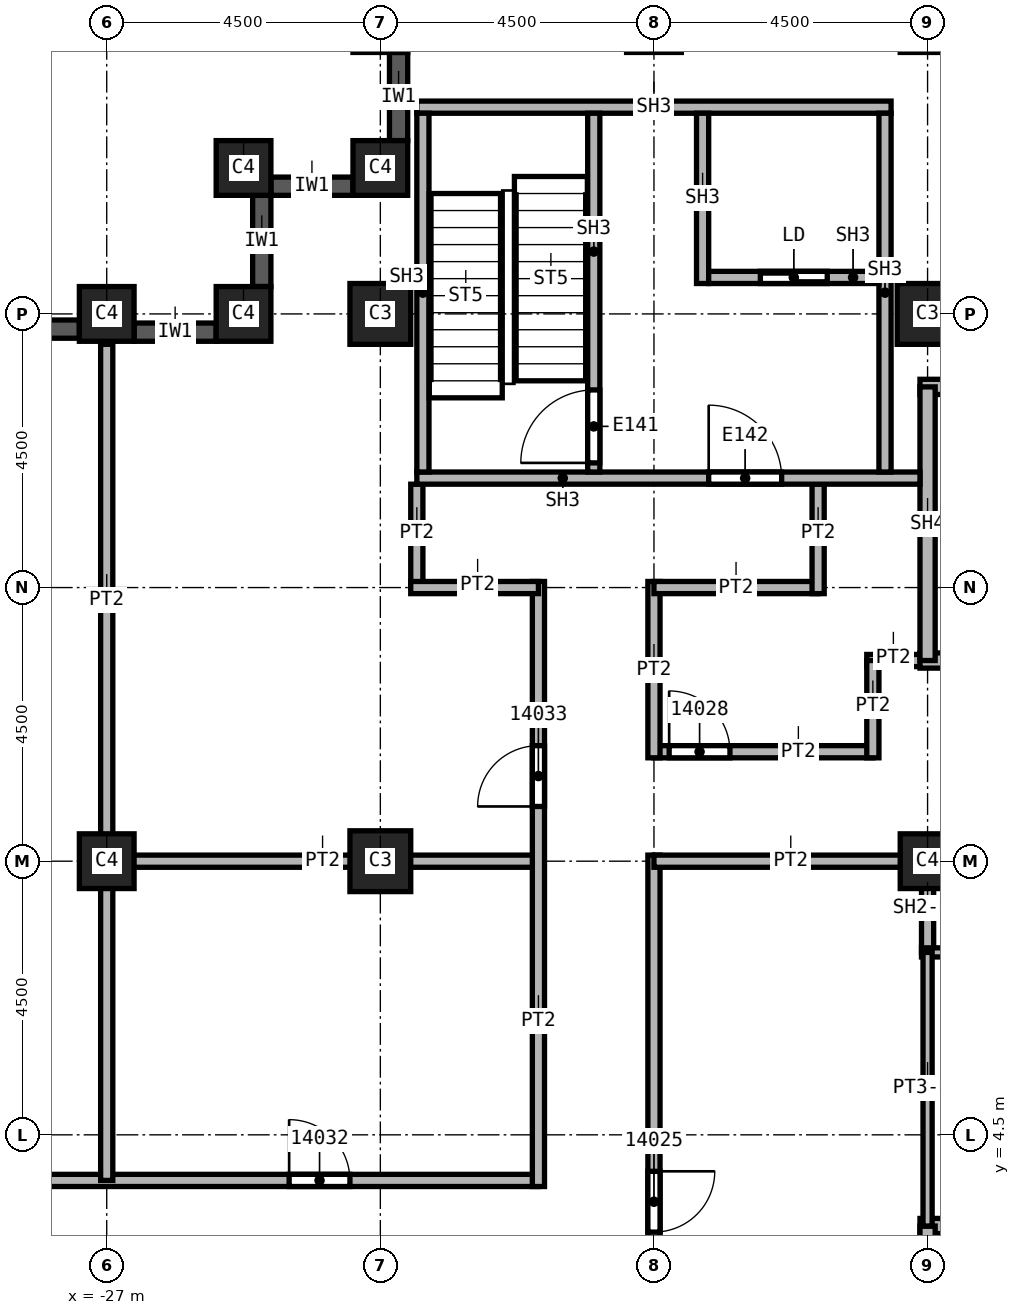
"""IFC4 building model, lengths in metres.
Left out: names, types, materials, properties, quantities, classifications, styles, units other than length and angle.
Written with IfcOpenShell. Run it as: python <this file> out.ifc"""

import sys

from ifc_helpers import new_model, si_unit, direction, frame, frame_2d, origin, origin_2d, place, context, subcontext, project, spatial, rectangle, extrude, element, fill, save


model = new_model("IFC4")
c1 = context("Model", 3, precision=1e-05, world=origin(), true_north=direction((0.0, 1.0)))
c2 = subcontext(c1, "Body", "Model", "MODEL_VIEW")
j1 = project(units=[si_unit("LENGTHUNIT", "METRE"), si_unit("PLANEANGLEUNIT", "RADIAN")], contexts=[c1])
p1 = place(None, origin())
s1 = spatial("IfcSite", under=j1, at=p1, CompositionType="ELEMENT")
p2 = place(p1, origin())
s2 = spatial("IfcBuilding", under=s1, at=p2, CompositionType="ELEMENT")
p3 = place(p2, frame((0.0, 0.0, 224.0)))
s3 = spatial("IfcBuildingStorey", under=s2, at=p3, CompositionType="ELEMENT", Elevation=224.0)
for number, where, z_axis, x_axis in (
    (1, (-13.5, 18.0, 0.0), (0.0, 0.0, 1.0), (1.0, 0.0, 0.0)),
    (2, (-22.5, 9.0, 0.0), (0.0, 0.0, 1.0), (1.0, 0.0, 0.0)),
    (3, (-22.5, 18.0, 0.0), (0.0, 0.0, 1.0), (1.0, 0.0, 0.0)),
):
    element("IfcColumn", number, at=place(p3, frame(where, z_axis=z_axis, x_axis=x_axis)), inside=s3, PredefinedType="COLUMN", context=c2, shape_type="SweptSolid", body=[
        extrude(rectangle(XDim=1.0, YDim=1.0, at=origin_2d()), origin(), (0.0, 0.0, 1.0), 3.72),
    ])
for number, where, z_axis, x_axis in (
    (4, (-13.5, 9.0, 0.0), (0.0, 0.0, 1.0), (1.0, 0.0, 0.0)),
    (5, (-27.0, 9.0, 0.0), (0.0, 0.0, 1.0), (1.0, 0.0, 0.0)),
    (6, (-27.0, 18.0, 0.0), (0.0, 0.0, 1.0), (1.0, 0.0, 0.0)),
    (7, (-22.5, 20.4, 0.0), (0.0, 0.0, 1.0), (1.0, 0.0, 0.0)),
    (8, (-24.75, 20.4, 0.0), (0.0, 0.0, 1.0), (1.0, 0.0, 0.0)),
    (9, (-24.75, 18.0, 0.0), (0.0, 0.0, 1.0), (1.0, 0.0, 0.0)),
):
    element("IfcColumn", number, at=place(p3, frame(where, z_axis=z_axis, x_axis=x_axis)), inside=s3, PredefinedType="COLUMN", context=c2, shape_type="SweptSolid", body=[
        extrude(rectangle(XDim=0.9, YDim=0.9, at=origin_2d()), origin(), (0.0, 0.0, 1.0), 3.72),
    ])
p4 = place(p3, frame((-22.95, 20.1, 0.0), z_axis=(0.0, 0.0, 1.0), x_axis=(-1.0, 0.0, 0.0)))
e10 = element("IfcWall", 10, at=p4, inside=s3, PredefinedType="SOLIDWALL", context=c2, shape_type="SweptSolid", body=[
    extrude(rectangle(XDim=1.35, YDim=0.3, at=frame_2d((0.675, 0.0))), origin(), (0.0, 0.0, 1.0), 3.12),
])
p5 = place(p3, frame((-24.45, 19.95, 0.0), z_axis=(0.0, 0.0, 1.0), x_axis=(0.0, -1.0, 0.0)))
e11 = element("IfcWall", 11, at=p5, inside=s3, PredefinedType="SOLIDWALL", context=c2, shape_type="SweptSolid", body=[
    extrude(rectangle(XDim=1.5, YDim=0.3, at=frame_2d((0.75, 0.0))), origin(), (0.0, 0.0, 1.0), 3.12),
])
p6 = place(p3, frame((-25.2, 17.7, 0.0), z_axis=(0.0, 0.0, 1.0), x_axis=(-1.0, 0.0, 0.0)))
e12 = element("IfcWall", 12, at=p6, inside=s3, PredefinedType="SOLIDWALL", context=c2, shape_type="SweptSolid", body=[
    extrude(rectangle(XDim=1.35, YDim=0.3, at=frame_2d((0.675, 0.0))), origin(), (0.0, 0.0, 1.0), 3.12),
])
p7 = place(p3, frame((-27.45, 17.75, 0.0), z_axis=(0.0, 0.0, 1.0), x_axis=(-1.0, 0.0, 0.0)))
e13 = element("IfcWall", 13, at=p7, inside=s3, PredefinedType="SOLIDWALL", context=c2, shape_type="SweptSolid", body=[
    extrude(rectangle(XDim=3.6, YDim=0.3, at=frame_2d((1.8, 0.0))), origin(), (0.0, 0.0, 1.0), 3.12),
])
p8 = place(p7, frame((0.6, 0.0, 0.8)))
e14 = element("IfcOpeningElement", 14, at=p8, cuts=e13, PredefinedType="OPENING", context=c2, shape_type="SweptSolid", body=[
    extrude(rectangle(XDim=2.4, YDim=1.95, at=frame_2d((1.2, 0.975))), frame((0.0, 0.15, 0.0), z_axis=(0.0, -1.0, 0.0), x_axis=(1.0, 0.0, 0.0)), (0.0, 0.0, 1.0), 0.3),
])
p9 = place(p3, frame((-22.2, 22.3, 0.0), z_axis=(0.0, 0.0, 1.0), x_axis=(0.0, -1.0, 0.0)))
e15 = element("IfcWall", 15, at=p9, inside=s3, PredefinedType="SOLIDWALL", context=c2, shape_type="SweptSolid", body=[
    extrude(rectangle(XDim=1.45, YDim=0.3, at=frame_2d((0.725, 0.0))), origin(), (0.0, 0.0, 1.0), 3.12),
])
p10 = place(p3, frame((-33.85, 3.75, 0.0), z_axis=(0.0, 0.0, 1.0), x_axis=(1.0, 0.0, 0.0)))
e16 = element("IfcWall", 16, at=p10, inside=s3, PredefinedType="PARTITIONING", context=c2, shape_type="SweptSolid", body=[
    extrude(rectangle(XDim=13.95, YDim=0.2, at=frame_2d((6.975, 0.0))), origin(), (0.0, 0.0, 1.0), 3.72),
])
p11 = place(p10, frame((9.85, 0.0, 0.0)))
e17 = element("IfcOpeningElement", 17, at=p11, cuts=e16, PredefinedType="OPENING", context=c2, shape_type="SweptSolid", body=[
    extrude(rectangle(XDim=1.0, YDim=2.1, at=frame_2d((0.5, 1.05))), frame((0.0, 0.1, 0.0), z_axis=(0.0, -1.0, 0.0), x_axis=(1.0, 0.0, 0.0)), (0.0, 0.0, 1.0), 0.2),
])
p12 = place(p3, frame((-27.1, 9.0, 0.0), z_axis=(0.0, 0.0, 1.0), x_axis=(1.0, 0.0, 0.0)))
e18 = element("IfcWall", 18, at=p12, inside=s3, PredefinedType="PARTITIONING", context=c2, shape_type="SweptSolid", body=[
    extrude(rectangle(XDim=7.2, YDim=0.2, at=frame_2d((3.6, 0.0))), origin(), (0.0, 0.0, 1.0), 3.72),
])
p13 = place(p3, frame((-27.0, 3.75, 0.0), z_axis=(0.0, 0.0, 1.0), x_axis=(0.0, 1.0, 0.0)))
e19 = element("IfcWall", 19, at=p13, inside=s3, PredefinedType="PARTITIONING", context=c2, shape_type="SweptSolid", body=[
    extrude(rectangle(XDim=13.75, YDim=0.2, at=frame_2d((6.875, 0.0))), origin(), (0.0, 0.0, 1.0), 3.72),
])
p14 = place(p3, frame((-21.9, 13.5, 0.0), z_axis=(0.0, 0.0, 1.0), x_axis=(0.0, 1.0, 0.0)))
e20 = element("IfcWall", 20, at=p14, inside=s3, PredefinedType="PARTITIONING", context=c2, shape_type="SweptSolid", body=[
    extrude(rectangle(XDim=1.7, YDim=0.2, at=frame_2d((0.85, 0.0))), origin(), (0.0, 0.0, 1.0), 3.72),
])
p15 = place(p3, frame((-19.9, 3.65, 0.0), z_axis=(0.0, 0.0, 1.0), x_axis=(0.0, 1.0, 0.0)))
e21 = element("IfcWall", 21, at=p15, inside=s3, PredefinedType="PARTITIONING", context=c2, shape_type="SweptSolid", body=[
    extrude(rectangle(XDim=9.95, YDim=0.2, at=frame_2d((4.975, 0.0))), origin(), (0.0, 0.0, 1.0), 3.72),
])
p16 = place(p15, frame((6.25, 0.0, 0.0)))
e22 = element("IfcOpeningElement", 22, at=p16, cuts=e21, PredefinedType="OPENING", context=c2, shape_type="SweptSolid", body=[
    extrude(rectangle(XDim=1.0, YDim=2.1, at=frame_2d((0.5, 1.05))), frame((0.0, 0.1, 0.0), z_axis=(0.0, -1.0, 0.0), x_axis=(1.0, 0.0, 0.0)), (0.0, 0.0, 1.0), 0.2),
])
p17 = place(p3, frame((-19.9, 13.5, 0.0), z_axis=(0.0, 0.0, 1.0), x_axis=(-1.0, 0.0, 0.0)))
e23 = element("IfcWall", 23, at=p17, inside=s3, PredefinedType="PARTITIONING", context=c2, shape_type="SweptSolid", body=[
    extrude(rectangle(XDim=2.1, YDim=0.2, at=frame_2d((1.05, 0.0))), origin(), (0.0, 0.0, 1.0), 3.72),
])
p18 = place(p3, frame((-18.0, 9.1, 0.0), z_axis=(0.0, 0.0, 1.0), x_axis=(0.0, -1.0, 0.0)))
e24 = element("IfcWall", 24, at=p18, inside=s3, PredefinedType="PARTITIONING", context=c2, shape_type="SweptSolid", body=[
    extrude(rectangle(XDim=18.2, YDim=0.2, at=frame_2d((9.1, 0.0))), origin(), (0.0, 0.0, 1.0), 3.72),
])
p19 = place(p18, frame((15.1, 0.0, 0.0)))
e25 = element("IfcOpeningElement", 25, at=p19, cuts=e24, PredefinedType="OPENING", context=c2, shape_type="SweptSolid", body=[
    extrude(rectangle(XDim=1.0, YDim=2.1, at=frame_2d((0.5, 1.05))), frame((0.0, 0.1, 0.0), z_axis=(0.0, -1.0, 0.0), x_axis=(1.0, 0.0, 0.0)), (0.0, 0.0, 1.0), 0.2),
])
p20 = place(p18, frame((5.2, 0.0, 0.0)))
e26 = element("IfcOpeningElement", 26, at=p20, cuts=e24, PredefinedType="OPENING", context=c2, shape_type="SweptSolid", body=[
    extrude(rectangle(XDim=1.0, YDim=2.1, at=frame_2d((0.5, 1.05))), frame((0.0, 0.1, 0.0), z_axis=(0.0, -1.0, 0.0), x_axis=(1.0, 0.0, 0.0)), (0.0, 0.0, 1.0), 0.2),
])
p21 = place(p3, frame((-18.0, 10.8, 0.0), z_axis=(0.0, 0.0, 1.0), x_axis=(1.0, 0.0, 0.0)))
e27 = element("IfcWall", 27, at=p21, inside=s3, PredefinedType="PARTITIONING", context=c2, shape_type="SweptSolid", body=[
    extrude(rectangle(XDim=3.6, YDim=0.2, at=frame_2d((1.8, 0.0))), origin(), (0.0, 0.0, 1.0), 3.72),
])
p22 = place(p21, frame((0.25, 0.0, 0.0)))
e28 = element("IfcOpeningElement", 28, at=p22, cuts=e27, PredefinedType="OPENING", context=c2, shape_type="SweptSolid", body=[
    extrude(rectangle(XDim=1.0, YDim=2.1, at=frame_2d((0.5, 1.05))), frame((0.0, 0.1, 0.0), z_axis=(0.0, -1.0, 0.0), x_axis=(1.0, 0.0, 0.0)), (0.0, 0.0, 1.0), 0.2),
])
p23 = place(p3, frame((-18.0, 13.6, 0.0), z_axis=(0.0, 0.0, 1.0), x_axis=(0.0, -1.0, 0.0)))
e29 = element("IfcWall", 29, at=p23, inside=s3, PredefinedType="PARTITIONING", context=c2, shape_type="SweptSolid", body=[
    extrude(rectangle(XDim=2.9, YDim=0.2, at=frame_2d((1.45, 0.0))), origin(), (0.0, 0.0, 1.0), 3.72),
])
p24 = place(p3, frame((-15.3, 13.5, 0.0), z_axis=(0.0, 0.0, 1.0), x_axis=(-1.0, 0.0, 0.0)))
e30 = element("IfcWall", 30, at=p24, inside=s3, PredefinedType="PARTITIONING", context=c2, shape_type="SweptSolid", body=[
    extrude(rectangle(XDim=2.7, YDim=0.2, at=frame_2d((1.35, 0.0))), origin(), (0.0, 0.0, 1.0), 3.72),
])
p25 = place(p3, frame((-15.3, 15.2, 0.0), z_axis=(0.0, 0.0, 1.0), x_axis=(0.0, -1.0, 0.0)))
e31 = element("IfcWall", 31, at=p25, inside=s3, PredefinedType="PARTITIONING", context=c2, shape_type="SweptSolid", body=[
    extrude(rectangle(XDim=1.8, YDim=0.2, at=frame_2d((0.9, 0.0))), origin(), (0.0, 0.0, 1.0), 3.72),
])
p26 = place(p3, frame((-14.5, 12.3, 0.0), z_axis=(0.0, 0.0, 1.0), x_axis=(1.0, 0.0, 0.0)))
e32 = element("IfcWall", 32, at=p26, inside=s3, PredefinedType="PARTITIONING", context=c2, shape_type="SweptSolid", body=[
    extrude(rectangle(XDim=1.125, YDim=0.2, at=frame_2d((0.562, 0.0))), origin(), (0.0, 0.0, 1.0), 3.72),
])
p27 = place(p3, frame((-13.5, 9.0, 0.0), z_axis=(0.0, 0.0, 1.0), x_axis=(-1.0, 0.0, 0.0)))
e33 = element("IfcWall", 33, at=p27, inside=s3, PredefinedType="PARTITIONING", context=c2, shape_type="SweptSolid", body=[
    extrude(rectangle(XDim=4.5, YDim=0.2, at=frame_2d((2.25, 0.0))), origin(), (0.0, 0.0, 1.0), 3.72),
])
p28 = place(p3, frame((-14.4, 10.7, 0.0), z_axis=(0.0, 0.0, 1.0), x_axis=(0.0, 1.0, 0.0)))
e34 = element("IfcWall", 34, at=p28, inside=s3, PredefinedType="PARTITIONING", context=c2, shape_type="SweptSolid", body=[
    extrude(rectangle(XDim=1.6, YDim=0.2, at=frame_2d((0.8, 0.0))), origin(), (0.0, 0.0, 1.0), 3.72),
])
p29 = place(p3, frame((-13.6, 9.0, 0.0), z_axis=(0.0, 0.0, 1.0), x_axis=(1.0, 0.0, 0.0)))
e35 = element("IfcWall", 35, at=p29, inside=s3, PredefinedType="SOLIDWALL", context=c2, shape_type="SweptSolid", body=[
    extrude(rectangle(XDim=3.1, YDim=0.2, at=frame_2d((1.55, 0.0))), origin(), (0.0, 0.0, 1.0), 2.958),
])
p30 = place(p29, frame((0.85, 0.0, 0.0)))
e36 = element("IfcOpeningElement", 36, at=p30, cuts=e35, PredefinedType="OPENING", context=c2, shape_type="SweptSolid", body=[
    extrude(rectangle(XDim=1.1, YDim=2.1, at=frame_2d((0.55, 1.05))), frame((0.0, 0.1, 0.0), z_axis=(0.0, -1.0, 0.0), x_axis=(1.0, 0.0, 0.0)), (0.0, 0.0, 1.0), 0.2),
])
p31 = place(p3, frame((-13.5, 7.5, 0.0), z_axis=(0.0, 0.0, 1.0), x_axis=(0.0, 1.0, 0.0)))
e37 = element("IfcWall", 37, at=p31, inside=s3, PredefinedType="SOLIDWALL", context=c2, shape_type="SweptSolid", body=[
    extrude(rectangle(XDim=1.6, YDim=0.2, at=frame_2d((0.8, 0.0))), origin(), (0.0, 0.0, 1.0), 2.958),
])
p32 = place(p3, frame((-13.625, 3.0, 0.0), z_axis=(0.0, 0.0, 1.0), x_axis=(1.0, 0.0, 0.0)))
e38 = element("IfcWall", 38, at=p32, inside=s3, PredefinedType="SOLIDWALL", context=c2, shape_type="SweptSolid", body=[
    extrude(rectangle(XDim=9.25, YDim=0.25, at=frame_2d((4.625, 0.0))), origin(), (0.0, 0.0, 1.0), 3.72),
])
p33 = place(p32, frame((3.25, 0.0, 0.0)))
e39 = element("IfcOpeningElement", 39, at=p33, cuts=e38, PredefinedType="OPENING", context=c2, shape_type="SweptSolid", body=[
    extrude(rectangle(XDim=1.1, YDim=2.1, at=frame_2d((0.55, 1.05))), frame((0.0, 0.125, 0.0), z_axis=(0.0, -1.0, 0.0), x_axis=(1.0, 0.0, 0.0)), (0.0, 0.0, 1.0), 0.25),
])
p34 = place(p3, frame((-13.5, -3.0, 0.0), z_axis=(0.0, 0.0, 1.0), x_axis=(0.0, 1.0, 0.0)))
e40 = element("IfcWall", 40, at=p34, inside=s3, PredefinedType="SOLIDWALL", context=c2, shape_type="SweptSolid", body=[
    extrude(rectangle(XDim=6.0, YDim=0.25, at=frame_2d((3.0, 0.0))), origin(), (0.0, 0.0, 1.0), 2.958),
])
p35 = place(p3, frame((-13.625, 12.3, 0.0), z_axis=(0.0, 0.0, 1.0), x_axis=(1.0, 0.0, 0.0)))
e41 = element("IfcWall", 41, at=p35, inside=s3, PredefinedType="SOLIDWALL", context=c2, shape_type="SweptSolid", body=[
    extrude(rectangle(XDim=9.25, YDim=0.25, at=frame_2d((4.625, 0.0))), origin(), (0.0, 0.0, 1.0), 3.72),
])
p36 = place(p35, frame((0.85, 0.0, 0.0)))
e42 = element("IfcOpeningElement", 42, at=p36, cuts=e41, PredefinedType="OPENING", context=c2, shape_type="SweptSolid", body=[
    extrude(rectangle(XDim=1.2, YDim=2.1, at=frame_2d((0.6, 1.05))), frame((0.0, 0.125, 0.0), z_axis=(0.0, -1.0, 0.0), x_axis=(1.0, 0.0, 0.0)), (0.0, 0.0, 1.0), 0.25),
])
p37 = place(p3, frame((-13.625, 16.8, 0.0), z_axis=(0.0, 0.0, 1.0), x_axis=(1.0, 0.0, 0.0)))
e43 = element("IfcWall", 43, at=p37, inside=s3, PredefinedType="SOLIDWALL", context=c2, shape_type="SweptSolid", body=[
    extrude(rectangle(XDim=9.25, YDim=0.25, at=frame_2d((4.625, 0.0))), origin(), (0.0, 0.0, 1.0), 3.72),
])
p38 = place(p3, frame((-13.5, 12.3, 0.0), z_axis=(0.0, 0.0, 1.0), x_axis=(0.0, 1.0, 0.0)))
e44 = element("IfcWall", 44, at=p38, inside=s3, PredefinedType="SOLIDWALL", context=c2, shape_type="SweptSolid", body=[
    extrude(rectangle(XDim=4.5, YDim=0.25, at=frame_2d((2.25, 0.0))), origin(), (0.0, 0.0, 1.0), 3.72),
])
p39 = place(p3, frame((-13.6, 7.5, 0.0), z_axis=(0.0, 0.0, 1.0), x_axis=(1.0, 0.0, 0.0)))
e45 = element("IfcWall", 45, at=p39, inside=s3, PredefinedType="PARTITIONING", context=c2, shape_type="SweptSolid", body=[
    extrude(rectangle(XDim=3.1, YDim=0.15, at=frame_2d((1.55, 0.0))), origin(), (0.0, 0.0, 1.0), 3.72),
])
p40 = place(p3, frame((-13.5, 3.0, 0.0), z_axis=(0.0, 0.0, 1.0), x_axis=(0.0, 1.0, 0.0)))
e46 = element("IfcWall", 46, at=p40, inside=s3, PredefinedType="PARTITIONING", context=c2, shape_type="SweptSolid", body=[
    extrude(rectangle(XDim=4.5, YDim=0.15, at=frame_2d((2.25, 0.0))), origin(), (0.0, 0.0, 1.0), 2.958),
])
p41 = place(p3, frame((-21.9, 15.3, 0.0), z_axis=(0.0, 0.0, 1.0), x_axis=(1.0, 0.0, 0.0)))
e47 = element("IfcWall", 47, at=p41, inside=s3, PredefinedType="SOLIDWALL", context=c2, shape_type="SweptSolid", body=[
    extrude(rectangle(XDim=8.275, YDim=0.2, at=frame_2d((4.137, 0.0))), origin(), (0.0, 0.0, 1.0), 3.72),
])
p42 = place(p41, frame((4.8, 0.0, 0.0)))
e48 = element("IfcOpeningElement", 48, at=p42, cuts=e47, PredefinedType="OPENING", context=c2, shape_type="SweptSolid", body=[
    extrude(rectangle(XDim=1.2, YDim=2.1, at=frame_2d((0.6, 1.05))), frame((0.0, 0.1, 0.0), z_axis=(0.0, -1.0, 0.0), x_axis=(1.0, 0.0, 0.0)), (0.0, 0.0, 1.0), 0.2),
])
p43 = place(p3, frame((-21.9, 21.4, 0.0), z_axis=(0.0, 0.0, 1.0), x_axis=(1.0, 0.0, 0.0)))
e49 = element("IfcWall", 49, at=p43, inside=s3, PredefinedType="SOLIDWALL", context=c2, shape_type="SweptSolid", body=[
    extrude(rectangle(XDim=7.8, YDim=0.2, at=frame_2d((3.9, 0.0))), origin(), (0.0, 0.0, 1.0), 3.72),
])
for number, where, z_axis, x_axis in (
    (50, (-21.8, 15.4, 0.0), (0.0, 0.0, 1.0), (0.0, 1.0, 0.0)),
    (51, (-14.2, 15.4, 0.0), (0.0, 0.0, 1.0), (0.0, 1.0, 0.0)),
):
    element("IfcWall", number, at=place(p3, frame(where, z_axis=z_axis, x_axis=x_axis)), inside=s3, PredefinedType="SOLIDWALL", context=c2, shape_type="SweptSolid", body=[
        extrude(rectangle(XDim=5.9, YDim=0.2, at=frame_2d((2.95, 0.0))), origin(), (0.0, 0.0, 1.0), 3.72),
    ])
p44 = place(p3, frame((-18.99, 15.4, 0.0), z_axis=(0.0, 0.0, 1.0), x_axis=(0.0, 1.0, 0.0)))
e52 = element("IfcWall", 52, at=p44, inside=s3, PredefinedType="SOLIDWALL", context=c2, shape_type="SweptSolid", body=[
    extrude(rectangle(XDim=5.9, YDim=0.2, at=frame_2d((2.95, 0.0))), origin(), (0.0, 0.0, 1.0), 3.72),
])
p45 = place(p44, frame((0.15, 0.0, 0.0)))
e53 = element("IfcOpeningElement", 53, at=p45, cuts=e52, PredefinedType="OPENING", context=c2, shape_type="SweptSolid", body=[
    extrude(rectangle(XDim=1.2, YDim=2.1, at=frame_2d((0.6, 1.05))), frame((0.0, 0.1, 0.0), z_axis=(0.0, -1.0, 0.0), x_axis=(1.0, 0.0, 0.0)), (0.0, 0.0, 1.0), 0.2),
])
p46 = place(p3, frame((-17.2, 18.5, 0.0), z_axis=(0.0, 0.0, 1.0), x_axis=(0.0, 1.0, 0.0)))
e54 = element("IfcWall", 54, at=p46, inside=s3, PredefinedType="SOLIDWALL", context=c2, shape_type="SweptSolid", body=[
    extrude(rectangle(XDim=2.8, YDim=0.2, at=frame_2d((1.4, 0.0))), origin(), (0.0, 0.0, 1.0), 3.72),
])
p47 = place(p3, frame((-17.1, 18.6, 0.0), z_axis=(0.0, 0.0, 1.0), x_axis=(1.0, 0.0, 0.0)))
e55 = element("IfcWall", 55, at=p47, inside=s3, PredefinedType="SOLIDWALL", context=c2, shape_type="SweptSolid", body=[
    extrude(rectangle(XDim=2.8, YDim=0.2, at=frame_2d((1.4, 0.0))), origin(), (0.0, 0.0, 1.0), 3.72),
])
p48 = place(p47, frame((0.85, 0.0, 0.0)))
e56 = element("IfcOpeningElement", 56, at=p48, cuts=e55, PredefinedType="OPENING", context=c2, shape_type="SweptSolid", body=[
    extrude(rectangle(XDim=1.1, YDim=2.1, at=frame_2d((0.55, 1.05))), frame((0.0, 0.1, 0.0), z_axis=(0.0, -1.0, 0.0), x_axis=(1.0, 0.0, 0.0)), (0.0, 0.0, 1.0), 0.2),
])
p49 = place(p20, origin())
e57 = element("IfcDoor", 57, at=p49, inside=s3, OperationType="SINGLE_SWING_RIGHT", PredefinedType="DOOR", context=c2, shape_type="SweptSolid", body=[
    extrude(rectangle(XDim=1.0, YDim=2.1, at=frame_2d((0.5, 1.05))), frame((0.0, 0.025, 0.0), z_axis=(0.0, -1.0, 0.0), x_axis=(1.0, 0.0, 0.0)), (0.0, 0.0, 1.0), 0.05),
])
fill(e26, e57)
p50 = place(p22, origin())
e58 = element("IfcDoor", 58, at=p50, inside=s3, OperationType="SINGLE_SWING_LEFT", PredefinedType="DOOR", context=c2, shape_type="SweptSolid", body=[
    extrude(rectangle(XDim=1.0, YDim=2.1, at=frame_2d((0.5, 1.05))), frame((0.0, 0.025, 0.0), z_axis=(0.0, -1.0, 0.0), x_axis=(1.0, 0.0, 0.0)), (0.0, 0.0, 1.0), 0.05),
])
fill(e28, e58)
p51 = place(p11, origin())
e59 = element("IfcDoor", 59, at=p51, inside=s3, OperationType="SINGLE_SWING_LEFT", PredefinedType="DOOR", context=c2, shape_type="SweptSolid", body=[
    extrude(rectangle(XDim=1.0, YDim=2.1, at=frame_2d((0.5, 1.05))), frame((0.0, 0.025, 0.0), z_axis=(0.0, -1.0, 0.0), x_axis=(1.0, 0.0, 0.0)), (0.0, 0.0, 1.0), 0.05),
])
fill(e17, e59)
p52 = place(p16, origin())
e60 = element("IfcDoor", 60, at=p52, inside=s3, OperationType="SINGLE_SWING_RIGHT", PredefinedType="DOOR", context=c2, shape_type="SweptSolid", body=[
    extrude(rectangle(XDim=1.0, YDim=2.1, at=frame_2d((0.5, 1.05))), frame((0.0, 0.025, 0.0), z_axis=(0.0, -1.0, 0.0), x_axis=(1.0, 0.0, 0.0)), (0.0, 0.0, 1.0), 0.05),
])
fill(e22, e60)
p53 = place(p45, origin())
e61 = element("IfcDoor", 61, at=p53, inside=s3, OperationType="SINGLE_SWING_LEFT", PredefinedType="DOOR", context=c2, shape_type="SweptSolid", body=[
    extrude(rectangle(XDim=1.2, YDim=2.1, at=frame_2d((0.6, 1.05))), frame((0.0, 0.025, 0.0), z_axis=(0.0, -1.0, 0.0), x_axis=(1.0, 0.0, 0.0)), (0.0, 0.0, 1.0), 0.05),
])
fill(e53, e61)
p54 = place(p48, origin())
e62 = element("IfcDoor", 62, at=p54, inside=s3, OperationType="SLIDING_TO_LEFT", PredefinedType="DOOR", context=c2, shape_type="SweptSolid", body=[
    extrude(rectangle(XDim=1.1, YDim=2.1, at=frame_2d((0.55, 1.05))), frame((0.0, 0.025, 0.0), z_axis=(0.0, -1.0, 0.0), x_axis=(1.0, 0.0, 0.0)), (0.0, 0.0, 1.0), 0.05),
])
fill(e56, e62)
p55 = place(p42, origin())
e63 = element("IfcDoor", 63, at=p55, inside=s3, OperationType="SINGLE_SWING_RIGHT", PredefinedType="DOOR", context=c2, shape_type="SweptSolid", body=[
    extrude(rectangle(XDim=1.2, YDim=2.1, at=frame_2d((0.6, 1.05))), frame((0.0, 0.025, 0.0), z_axis=(0.0, -1.0, 0.0), x_axis=(1.0, 0.0, 0.0)), (0.0, 0.0, 1.0), 0.05),
])
fill(e48, e63)
save(model, sys.argv[1])
